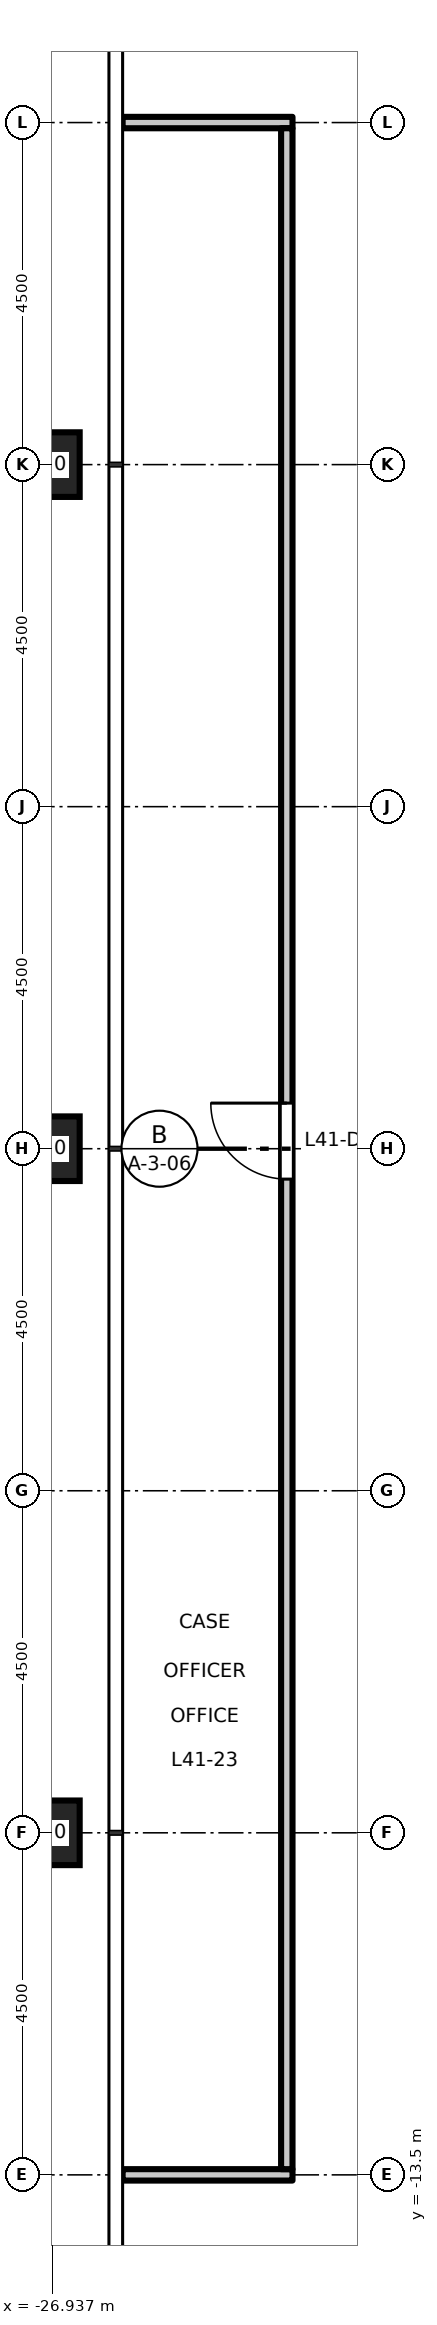
"""IFC4 building model, lengths in metres.
Left out: names, types, materials, properties, quantities, classifications, styles, units other than length and angle.
Written with IfcOpenShell. Run it as: python <this file> out.ifc"""

import sys

from ifc_helpers import new_model, si_unit, direction, frame, frame_2d, origin, origin_2d, place, context, subcontext, project, spatial, rectangle, hollow_rectangle, extrude, element, fill, save


model = new_model("IFC4")
c1 = context("Model", 3, precision=1e-05, world=origin(), true_north=direction((0.0, 1.0)))
c2 = subcontext(c1, "Body", "Model", "MODEL_VIEW")
j1 = project(units=[si_unit("LENGTHUNIT", "METRE"), si_unit("PLANEANGLEUNIT", "RADIAN")], contexts=[c1])
p1 = place(None, origin())
s1 = spatial("IfcSite", under=j1, at=p1, CompositionType="ELEMENT")
p2 = place(p1, origin())
s2 = spatial("IfcBuilding", under=s1, at=p2, CompositionType="ELEMENT")
p3 = place(p2, frame((0.0, 0.0, 192.7)))
s3 = spatial("IfcBuildingStorey", under=s2, at=p3, CompositionType="ELEMENT", Elevation=192.7)
for number, where, z_axis, x_axis in (
    (1, (-27.0, 9.0, 0.0), (0.0, 0.0, 1.0), (1.0, 0.0, 0.0)),
    (2, (-27.0, 0.0, 0.0), (0.0, 0.0, 1.0), (1.0, 0.0, 0.0)),
    (3, (-27.0, -9.0, 0.0), (0.0, 0.0, 1.0), (1.0, 0.0, 0.0)),
):
    element("IfcColumn", number, at=place(p3, frame(where, z_axis=z_axis, x_axis=x_axis)), inside=s3, PredefinedType="COLUMN", context=c2, shape_type="SweptSolid", body=[
        extrude(hollow_rectangle(XDim=0.85, YDim=0.85, WallThickness=0.05, at=origin_2d()), origin(), (0.0, 0.0, 1.0), 4.5),
    ])
p4 = place(p3, frame((-26.01, -13.5, 0.0), z_axis=(0.0, 0.0, 1.0), x_axis=(1.0, 0.0, 0.0)))
e4 = element("IfcWall", 4, at=p4, inside=s3, PredefinedType="PARTITIONING", context=c2, shape_type="SweptSolid", body=[
    extrude(rectangle(XDim=2.235, YDim=0.15, at=frame_2d((1.118, 0.0))), origin(), (0.0, 0.0, 1.0), 3.95),
])
p5 = place(p3, frame((-26.01, 13.5, 0.0), z_axis=(0.0, 0.0, 1.0), x_axis=(1.0, 0.0, 0.0)))
e5 = element("IfcWall", 5, at=p5, inside=s3, PredefinedType="PARTITIONING", context=c2, shape_type="SweptSolid", body=[
    extrude(rectangle(XDim=2.235, YDim=0.15, at=frame_2d((1.118, 0.0))), origin(), (0.0, 0.0, 1.0), 4.35),
])
p6 = place(p3, frame((-23.85, -13.425, 0.0), z_axis=(0.0, 0.0, 1.0), x_axis=(0.0, 1.0, 0.0)))
e6 = element("IfcWall", 6, at=p6, inside=s3, PredefinedType="PARTITIONING", context=c2, shape_type="SweptSolid", body=[
    extrude(rectangle(XDim=26.85, YDim=0.15, at=frame_2d((13.425, 0.0))), origin(), (0.0, 0.0, 1.0), 4.35),
])
p7 = place(p6, frame((13.025, 0.0, 0.0)))
e7 = element("IfcOpeningElement", 7, at=p7, cuts=e6, PredefinedType="OPENING", context=c2, shape_type="SweptSolid", body=[
    extrude(rectangle(XDim=1.0, YDim=2.1, at=frame_2d((0.5, 1.05))), frame((0.0, 0.085, 0.0), z_axis=(0.0, -1.0, 0.0), x_axis=(1.0, 0.0, 0.0)), (0.0, 0.0, 1.0), 0.17),
])
p8 = place(p7, origin())
e8 = element("IfcDoor", 8, at=p8, inside=s3, OperationType="SINGLE_SWING_RIGHT", PredefinedType="DOOR", context=c2, shape_type="SweptSolid", body=[
    extrude(rectangle(XDim=1.0, YDim=2.1, at=frame_2d((0.5, 1.05))), frame((0.0, 0.025, 0.0), z_axis=(0.0, -1.0, 0.0), x_axis=(1.0, 0.0, 0.0)), (0.0, 0.0, 1.0), 0.05),
])
fill(e7, e8)
save(model, sys.argv[1])
